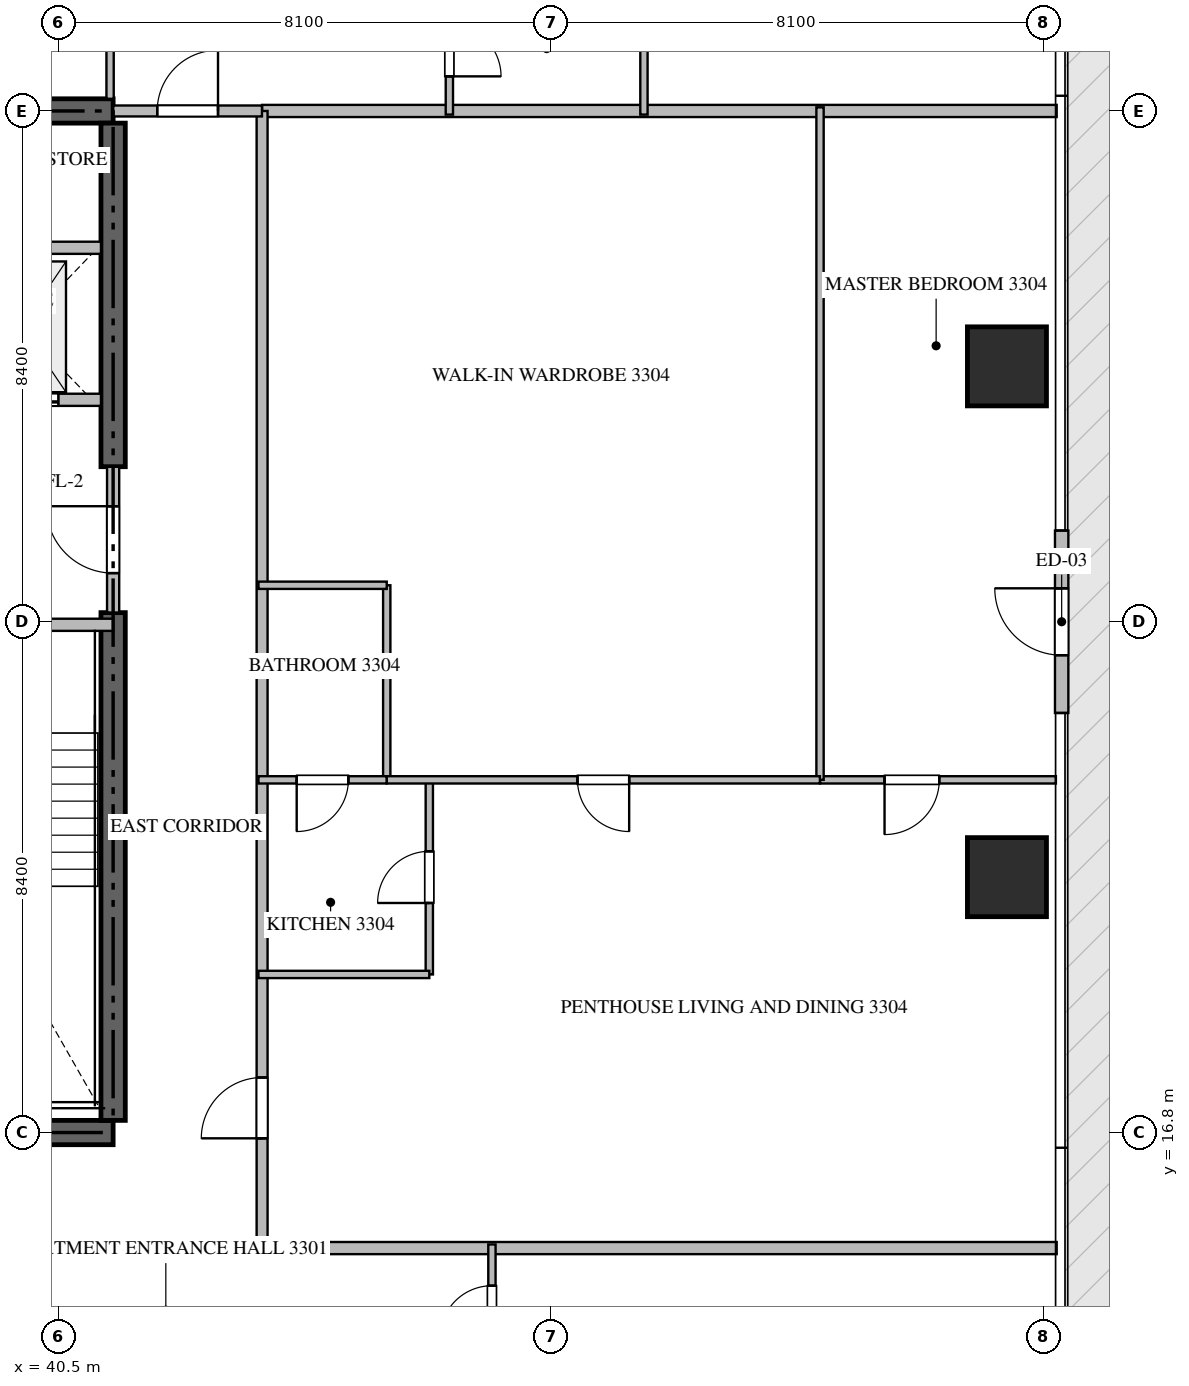
"""IFC4 building model, lengths in metres.
Left out: names, types, materials, properties, quantities, classifications, styles, units other than length and angle.
Written with IfcOpenShell. Run it as: python <this file> out.ifc"""

import sys

from ifc_helpers import new_model, si_unit, direction, frame, frame_2d, origin, origin_2d, place, context, subcontext, project, spatial, rectangle, extrude, source, transform, mapped, element, fill, save


model = new_model("IFC4")
c1 = context("Model", 3, precision=1e-05, world=origin(), true_north=direction((0.0, 1.0)))
c2 = subcontext(c1, "Body", "Model", "MODEL_VIEW")
j1 = project(units=[si_unit("LENGTHUNIT", "METRE"), si_unit("PLANEANGLEUNIT", "RADIAN")], contexts=[c1])
p1 = place(None, origin())
s1 = spatial("IfcSite", under=j1, at=p1, CompositionType="ELEMENT")
p2 = place(p1, origin())
s2 = spatial("IfcBuilding", under=s1, at=p2, CompositionType="ELEMENT")
p3 = place(p2, frame((0.0, 0.0, 135.15)))
s3 = spatial("IfcBuildingStorey", under=s2, at=p3, CompositionType="ELEMENT", Elevation=135.15)
for number, where, z_axis, x_axis in (
    (1, (23.4, 16.8, -0.26), (0.0, 0.0, 1.0), (1.0, 0.0, 0.0)),
    (2, (41.4, 33.6, -0.26), (0.0, 0.0, 1.0), (-1.0, 0.0, 0.0)),
):
    element("IfcWall", number, at=place(p3, frame(where, z_axis=z_axis, x_axis=x_axis)), inside=s3, PredefinedType="SHEAR", context=c2, shape_type="SweptSolid", body=[
        extrude(rectangle(XDim=18.0, YDim=0.4, at=frame_2d((9.0, 0.0))), origin(), (0.0, 0.0, 1.0), 3.748),
    ])
p4 = place(p3, frame((41.4, 17.0, -0.26), z_axis=(0.0, 0.0, 1.0), x_axis=(0.0, 1.0, 0.0)))
e3 = element("IfcWall", 3, at=p4, inside=s3, PredefinedType="SHEAR", context=c2, shape_type="SweptSolid", body=[
    extrude(rectangle(XDim=8.35, YDim=0.4, at=frame_2d((4.175, 0.0))), origin(), (0.0, 0.0, 1.0), 3.748),
])
p5 = place(p3, frame((41.4, 27.75, -0.26), z_axis=(0.0, 0.0, 1.0), x_axis=(0.0, 1.0, 0.0)))
e4 = element("IfcWall", 4, at=p5, inside=s3, PredefinedType="SHEAR", context=c2, shape_type="SweptSolid", body=[
    extrude(rectangle(XDim=5.65, YDim=0.4, at=frame_2d((2.825, 0.0))), origin(), (0.0, 0.0, 1.0), 3.748),
])
m1 = source(origin(), c2, "Body", "SweptSolid", [
    extrude(rectangle(XDim=1.3, YDim=1.3, at=origin_2d()), origin(), (0.0, 0.0, 1.0), 3.75),
])
for number, where, z_axis, x_axis in (
    (5, (56.1, 21.0, -0.26), (0.0, 0.0, 1.0), (1.0, 0.0, 0.0)),
    (6, (56.1, 29.4, -0.26), (0.0, 0.0, 1.0), (1.0, 0.0, 0.0)),
):
    element("IfcColumn", number, at=place(p3, frame(where, z_axis=z_axis, x_axis=x_axis)), inside=s3, PredefinedType="COLUMN", context=c2, shape_type="MappedRepresentation", body=[
        mapped(m1, transform((0.0, 0.0, 0.0), scale=1.0)),
    ])
p6 = place(p3, frame((57.0, 23.7, 0.0), z_axis=(0.0, 0.0, 1.0), x_axis=(0.0, 1.0, 0.0)))
e7 = element("IfcWall", 7, at=p6, inside=s3, PredefinedType="ELEMENTEDWALL", context=c2, shape_type="SweptSolid", body=[
    extrude(rectangle(XDim=3.0, YDim=0.22, at=frame_2d((1.5, 0.0))), origin(), (0.0, 0.0, 1.0), 3.475),
])
p7 = place(p6, frame((0.95, 0.0, 0.0)))
e8 = element("IfcOpeningElement", 8, at=p7, cuts=e7, PredefinedType="OPENING", context=c2, shape_type="SweptSolid", body=[
    extrude(rectangle(XDim=1.1, YDim=2.2, at=frame_2d((0.55, 1.1))), frame((0.0, 0.12, 0.0), z_axis=(0.0, -1.0, 0.0), x_axis=(1.0, 0.0, 0.0)), (0.0, 0.0, 1.0), 0.24),
])
p8 = place(p3, frame((36.95, 25.15, 0.0), z_axis=(0.0, 0.0, 1.0), x_axis=(1.0, 0.0, 0.0)))
e9 = element("IfcWall", 9, at=p8, inside=s3, PredefinedType="STANDARD", context=c2, shape_type="SweptSolid", body=[
    extrude(rectangle(XDim=4.45, YDim=0.2, at=frame_2d((2.225, 0.0))), origin(), (0.0, 0.0, 1.0), 3.49),
])
p9 = place(p8, frame((1.65, 0.0, 0.0)))
e10 = element("IfcOpeningElement", 10, at=p9, cuts=e9, PredefinedType="OPENING", context=c2, shape_type="SweptSolid", body=[
    extrude(rectangle(XDim=1.1, YDim=2.15, at=frame_2d((0.55, 1.075))), frame((0.0, 0.11, 0.0), z_axis=(0.0, -1.0, 0.0), x_axis=(1.0, 0.0, 0.0)), (0.0, 0.0, 1.0), 0.22),
])
p10 = place(p3, frame((38.75, 28.85, 0.0), z_axis=(0.0, 0.0, 1.0), x_axis=(1.0, 0.0, 0.0)))
e11 = element("IfcWall", 11, at=p10, inside=s3, PredefinedType="STANDARD", context=c2, shape_type="SweptSolid", body=[
    extrude(rectangle(XDim=2.45, YDim=0.2, at=frame_2d((1.225, 0.0))), origin(), (0.0, 0.0, 1.0), 3.49),
])
p11 = place(p10, frame((0.55, 0.0, 0.0)))
e12 = element("IfcOpeningElement", 12, at=p11, cuts=e11, PredefinedType="OPENING", context=c2, shape_type="SweptSolid", body=[
    extrude(rectangle(XDim=1.2, YDim=2.2, at=frame_2d((0.6, 1.1))), frame((0.0, 0.11, 0.0), z_axis=(0.0, -1.0, 0.0), x_axis=(1.0, 0.0, 0.0)), (0.0, 0.0, 1.0), 0.22),
])
p12 = place(p3, frame((38.75, 31.35, 0.0), z_axis=(0.0, 0.0, 1.0), x_axis=(1.0, 0.0, 0.0)))
e13 = element("IfcWall", 13, at=p12, inside=s3, PredefinedType="STANDARD", context=c2, shape_type="SweptSolid", body=[
    extrude(rectangle(XDim=2.45, YDim=0.2, at=frame_2d((1.225, 0.0))), origin(), (0.0, 0.0, 1.0), 3.49),
])
p13 = place(p3, frame((41.4, 25.352, 0.0), z_axis=(0.0, 0.0, 1.0), x_axis=(0.0, 1.0, 0.0)))
e14 = element("IfcWall", 14, at=p13, inside=s3, PredefinedType="STANDARD", context=c2, shape_type="SweptSolid", body=[
    extrude(rectangle(XDim=2.396, YDim=0.2, at=frame_2d((1.198, 0.0))), origin(), (0.0, 0.0, 1.0), 3.49),
])
p14 = place(p13, frame((0.648, 0.0, 0.0)))
e15 = element("IfcOpeningElement", 15, at=p14, cuts=e14, PredefinedType="OPENING", context=c2, shape_type="SweptSolid", body=[
    extrude(rectangle(XDim=1.1, YDim=2.15, at=frame_2d((0.55, 1.075))), frame((0.0, 0.11, 0.0), z_axis=(0.0, -1.0, 0.0), x_axis=(1.0, 0.0, 0.0)), (0.0, 0.0, 1.0), 0.22),
])
for number, where, z_axis, x_axis in (
    (16, (43.85, 14.9, 0.0), (0.0, 0.0, 1.0), (1.0, 0.0, 0.0)),
    (17, (43.85, 33.6, 0.0), (0.0, 0.0, 1.0), (1.0, 0.0, 0.0)),
):
    element("IfcWall", number, at=place(p3, frame(where, z_axis=z_axis, x_axis=x_axis)), inside=s3, PredefinedType="PARTITIONING", context=c2, shape_type="SweptSolid", body=[
        extrude(rectangle(XDim=13.068, YDim=0.2, at=frame_2d((6.534, 0.0))), origin(), (0.0, 0.0, 1.0), 3.49),
    ])
p15 = place(p3, frame((20.952, 14.9, 0.0), z_axis=(0.0, 0.0, 1.0), x_axis=(1.0, 0.0, 0.0)))
e18 = element("IfcWall", 18, at=p15, inside=s3, PredefinedType="PARTITIONING", context=c2, shape_type="SweptSolid", body=[
    extrude(rectangle(XDim=22.896, YDim=0.18, at=frame_2d((11.448, 0.0))), origin(), (0.0, 0.0, 1.0), 3.49),
])
p16 = place(p15, frame((15.809, 0.0, 0.0)))
e19 = element("IfcOpeningElement", 19, at=p16, cuts=e18, PredefinedType="OPENING", context=c2, shape_type="SweptSolid", body=[
    extrude(rectangle(XDim=1.0, YDim=2.15, at=frame_2d((0.5, 1.075))), frame((0.0, 0.1, 0.0), z_axis=(0.0, -1.0, 0.0), x_axis=(1.0, 0.0, 0.0)), (0.0, 0.0, 1.0), 0.2),
])
p17 = place(p3, frame((43.85, 14.9, 0.0), z_axis=(0.0, 0.0, 1.0), x_axis=(0.0, 1.0, 0.0)))
e20 = element("IfcWall", 20, at=p17, inside=s3, PredefinedType="PARTITIONING", context=c2, shape_type="SweptSolid", body=[
    extrude(rectangle(XDim=18.7, YDim=0.18, at=frame_2d((9.35, 0.0))), origin(), (0.0, 0.0, 1.0), 3.49),
])
p18 = place(p17, frame((1.805, 0.0, 0.0)))
e21 = element("IfcOpeningElement", 21, at=p18, cuts=e20, PredefinedType="OPENING", context=c2, shape_type="SweptSolid", body=[
    extrude(rectangle(XDim=1.0, YDim=2.15, at=frame_2d((0.5, 1.075))), frame((0.0, 0.1, 0.0), z_axis=(0.0, -1.0, 0.0), x_axis=(1.0, 0.0, 0.0)), (0.0, 0.0, 1.0), 0.2),
])
p19 = place(p3, frame((41.402, 33.6, 0.0), z_axis=(0.0, 0.0, 1.0), x_axis=(1.0, 0.0, 0.0)))
e22 = element("IfcWall", 22, at=p19, inside=s3, PredefinedType="PARTITIONING", context=c2, shape_type="SweptSolid", body=[
    extrude(rectangle(XDim=2.446, YDim=0.18, at=frame_2d((1.223, 0.0))), origin(), (0.0, 0.0, 1.0), 3.49),
])
p20 = place(p19, frame((0.723, 0.0, 0.0)))
e23 = element("IfcOpeningElement", 23, at=p20, cuts=e22, PredefinedType="OPENING", context=c2, shape_type="SweptSolid", body=[
    extrude(rectangle(XDim=1.0, YDim=2.15, at=frame_2d((0.5, 1.075))), frame((0.0, 0.1, 0.0), z_axis=(0.0, -1.0, 0.0), x_axis=(1.0, 0.0, 0.0)), (0.0, 0.0, 1.0), 0.2),
])
p21 = place(p3, frame((47.63, 12.752, 0.0), z_axis=(0.0, 0.0, 1.0), x_axis=(0.0, 1.0, 0.0)))
e24 = element("IfcWall", 24, at=p21, inside=s3, PredefinedType="PARTITIONING", context=c2, shape_type="SweptSolid", body=[
    extrude(rectangle(XDim=2.208, YDim=0.12, at=frame_2d((1.104, 0.0))), origin(), (0.0, 0.0, 1.0), 3.49),
])
p22 = place(p21, frame((0.679, 0.0, 0.0)))
e25 = element("IfcOpeningElement", 25, at=p22, cuts=e24, PredefinedType="OPENING", context=c2, shape_type="SweptSolid", body=[
    extrude(rectangle(XDim=0.85, YDim=2.1, at=frame_2d((0.425, 1.05))), frame((0.0, 0.07, 0.0), z_axis=(0.0, -1.0, 0.0), x_axis=(1.0, 0.0, 0.0)), (0.0, 0.0, 1.0), 0.14),
])
p23 = place(p3, frame((41.35, 36.35, 0.0), z_axis=(0.0, 0.0, 1.0), x_axis=(0.0, -1.0, 0.0)))
e26 = element("IfcWall", 26, at=p23, inside=s3, PredefinedType="PARTITIONING", context=c2, shape_type="SweptSolid", body=[
    extrude(rectangle(XDim=2.55, YDim=0.12, at=frame_2d((1.275, 0.0))), origin(), (0.0, 0.0, 1.0), 3.49),
])
p24 = place(p3, frame((50.13, 35.65, 0.0), z_axis=(0.0, 0.0, 1.0), x_axis=(0.0, -1.0, 0.0)))
e27 = element("IfcWall", 27, at=p24, inside=s3, PredefinedType="PARTITIONING", context=c2, shape_type="SweptSolid", body=[
    extrude(rectangle(XDim=2.11, YDim=0.12, at=frame_2d((1.055, 0.0))), origin(), (0.0, 0.0, 1.0), 3.49),
])
p25 = place(p3, frame((46.93, 35.648, 0.0), z_axis=(0.0, 0.0, 1.0), x_axis=(0.0, -1.0, 0.0)))
e28 = element("IfcWall", 28, at=p25, inside=s3, PredefinedType="PARTITIONING", context=c2, shape_type="SweptSolid", body=[
    extrude(rectangle(XDim=2.108, YDim=0.12, at=frame_2d((1.054, 0.0))), origin(), (0.0, 0.0, 1.0), 3.49),
])
p26 = place(p25, frame((0.629, 0.0, 0.0)))
e29 = element("IfcOpeningElement", 29, at=p26, cuts=e28, PredefinedType="OPENING", context=c2, shape_type="SweptSolid", body=[
    extrude(rectangle(XDim=0.85, YDim=2.1, at=frame_2d((0.425, 1.05))), frame((0.0, 0.07, 0.0), z_axis=(0.0, -1.0, 0.0), x_axis=(1.0, 0.0, 0.0)), (0.0, 0.0, 1.0), 0.14),
])
p27 = place(p3, frame((46.6, 19.4, 0.0), z_axis=(0.0, 0.0, 1.0), x_axis=(0.0, 1.0, 0.0)))
e30 = element("IfcWall", 30, at=p27, inside=s3, PredefinedType="PARTITIONING", context=c2, shape_type="SweptSolid", body=[
    extrude(rectangle(XDim=3.2, YDim=0.12, at=frame_2d((1.6, 0.0))), origin(), (0.0, 0.0, 1.0), 3.49),
])
p28 = place(p27, frame((1.175, 0.0, 0.0)))
e31 = element("IfcOpeningElement", 31, at=p28, cuts=e30, PredefinedType="OPENING", context=c2, shape_type="SweptSolid", body=[
    extrude(rectangle(XDim=0.85, YDim=2.1, at=frame_2d((0.425, 1.05))), frame((0.0, 0.07, 0.0), z_axis=(0.0, -1.0, 0.0), x_axis=(1.0, 0.0, 0.0)), (0.0, 0.0, 1.0), 0.14),
])
p29 = place(p3, frame((46.6, 19.4, 0.0), z_axis=(0.0, 0.0, 1.0), x_axis=(-1.0, 0.0, 0.0)))
e32 = element("IfcWall", 32, at=p29, inside=s3, PredefinedType="PARTITIONING", context=c2, shape_type="SweptSolid", body=[
    extrude(rectangle(XDim=2.81, YDim=0.12, at=frame_2d((1.405, 0.0))), origin(), (0.0, 0.0, 1.0), 3.49),
])
p30 = place(p3, frame((56.905, 22.6, 0.0), z_axis=(0.0, 0.0, 1.0), x_axis=(-1.0, 0.0, 0.0)))
e33 = element("IfcWall", 33, at=p30, inside=s3, PredefinedType="PARTITIONING", context=c2, shape_type="SweptSolid", body=[
    extrude(rectangle(XDim=3.879, YDim=0.12, at=frame_2d((1.939, 0.0))), origin(), (0.0, 0.0, 1.0), 3.49),
])
p31 = place(p30, frame((1.918, 0.0, 0.0)))
e34 = element("IfcOpeningElement", 34, at=p31, cuts=e33, PredefinedType="OPENING", context=c2, shape_type="SweptSolid", body=[
    extrude(rectangle(XDim=0.9, YDim=2.1, at=frame_2d((0.45, 1.05))), frame((0.0, 0.07, 0.0), z_axis=(0.0, -1.0, 0.0), x_axis=(1.0, 0.0, 0.0)), (0.0, 0.0, 1.0), 0.14),
])
p32 = place(p3, frame((53.026, 22.6, 0.0), z_axis=(0.0, 0.0, 1.0), x_axis=(0.0, 1.0, 0.0)))
e35 = element("IfcWall", 35, at=p32, inside=s3, PredefinedType="PARTITIONING", context=c2, shape_type="SweptSolid", body=[
    extrude(rectangle(XDim=11.06, YDim=0.12, at=frame_2d((5.53, 0.0))), origin(), (0.0, 0.0, 1.0), 3.49),
])
p33 = place(p3, frame((45.9, 22.6, 0.0), z_axis=(0.0, 0.0, 1.0), x_axis=(0.0, 1.0, 0.0)))
e36 = element("IfcWall", 36, at=p33, inside=s3, PredefinedType="PARTITIONING", context=c2, shape_type="SweptSolid", body=[
    extrude(rectangle(XDim=3.2, YDim=0.12, at=frame_2d((1.6, 0.0))), origin(), (0.0, 0.0, 1.0), 3.49),
])
p34 = place(p3, frame((45.9, 25.8, 0.0), z_axis=(0.0, 0.0, 1.0), x_axis=(-1.0, 0.0, 0.0)))
e37 = element("IfcWall", 37, at=p34, inside=s3, PredefinedType="PARTITIONING", context=c2, shape_type="SweptSolid", body=[
    extrude(rectangle(XDim=2.11, YDim=0.12, at=frame_2d((1.055, 0.0))), origin(), (0.0, 0.0, 1.0), 3.49),
])
p35 = place(p3, frame((53.024, 22.6, 0.0), z_axis=(0.0, 0.0, 1.0), x_axis=(-1.0, 0.0, 0.0)))
e38 = element("IfcWall", 38, at=p35, inside=s3, PredefinedType="PARTITIONING", context=c2, shape_type="SweptSolid", body=[
    extrude(rectangle(XDim=7.124, YDim=0.12, at=frame_2d((3.562, 0.0))), origin(), (0.0, 0.0, 1.0), 3.49),
])
p36 = place(p35, frame((3.137, 0.0, 0.0)))
e39 = element("IfcOpeningElement", 39, at=p36, cuts=e38, PredefinedType="OPENING", context=c2, shape_type="SweptSolid", body=[
    extrude(rectangle(XDim=0.85, YDim=2.1, at=frame_2d((0.425, 1.05))), frame((0.0, 0.07, 0.0), z_axis=(0.0, -1.0, 0.0), x_axis=(1.0, 0.0, 0.0)), (0.0, 0.0, 1.0), 0.14),
])
p37 = place(p3, frame((45.898, 22.6, 0.0), z_axis=(0.0, 0.0, 1.0), x_axis=(-1.0, 0.0, 0.0)))
e40 = element("IfcWall", 40, at=p37, inside=s3, PredefinedType="PARTITIONING", context=c2, shape_type="SweptSolid", body=[
    extrude(rectangle(XDim=2.108, YDim=0.12, at=frame_2d((1.054, 0.0))), origin(), (0.0, 0.0, 1.0), 3.49),
])
p38 = place(p37, frame((0.629, 0.0, 0.0)))
e41 = element("IfcOpeningElement", 41, at=p38, cuts=e40, PredefinedType="OPENING", context=c2, shape_type="SweptSolid", body=[
    extrude(rectangle(XDim=0.85, YDim=2.1, at=frame_2d((0.425, 1.05))), frame((0.0, 0.07, 0.0), z_axis=(0.0, -1.0, 0.0), x_axis=(1.0, 0.0, 0.0)), (0.0, 0.0, 1.0), 0.14),
])
m2 = source(origin(), c2, "Body", "SweptSolid", [
    extrude(rectangle(XDim=1.1, YDim=2.2, at=frame_2d((0.55, 1.1))), frame((0.0, 0.025, 0.0), z_axis=(0.0, -1.0, 0.0), x_axis=(1.0, 0.0, 0.0)), (0.0, 0.0, 1.0), 0.05),
])
p39 = place(p7, origin())
e42 = element("IfcDoor", 42, at=p39, inside=s3, OperationType="SINGLE_SWING_RIGHT", PredefinedType="DOOR", context=c2, shape_type="MappedRepresentation", body=[
    mapped(m2, transform((0.0, 0.0, 0.0), scale=1.0)),
])
fill(e8, e42)
m3 = source(origin(), c2, "Body", "SweptSolid", [
    extrude(rectangle(XDim=1.2, YDim=2.2, at=frame_2d((0.6, 1.1))), frame((0.0, 0.025, 0.0), z_axis=(0.0, -1.0, 0.0), x_axis=(1.0, 0.0, 0.0)), (0.0, 0.0, 1.0), 0.05),
])
p40 = place(p11, origin())
e43 = element("IfcDoor", 43, at=p40, inside=s3, OperationType="DOUBLE_DOOR_SLIDING", PredefinedType="DOOR", context=c2, shape_type="MappedRepresentation", body=[
    mapped(m3, transform((0.0, 0.0, 0.0), scale=1.0)),
])
fill(e12, e43)
m4 = source(origin(), c2, "Body", "SweptSolid", [
    extrude(rectangle(XDim=1.1, YDim=2.15, at=frame_2d((0.55, 1.075))), frame((0.0, 0.025, 0.0), z_axis=(0.0, -1.0, 0.0), x_axis=(1.0, 0.0, 0.0)), (0.0, 0.0, 1.0), 0.05),
])
p41 = place(p14, origin())
e44 = element("IfcDoor", 44, at=p41, inside=s3, OperationType="SINGLE_SWING_RIGHT", PredefinedType="DOOR", context=c2, shape_type="MappedRepresentation", body=[
    mapped(m4, transform((0.0, 0.0, 0.0), scale=1.0)),
])
fill(e15, e44)
m5 = source(origin(), c2, "Body", "SweptSolid", [
    extrude(rectangle(XDim=1.0, YDim=2.15, at=frame_2d((0.5, 1.075))), frame((0.0, 0.025, 0.0), z_axis=(0.0, -1.0, 0.0), x_axis=(1.0, 0.0, 0.0)), (0.0, 0.0, 1.0), 0.05),
])
p42 = place(p18, origin())
e45 = element("IfcDoor", 45, at=p42, inside=s3, OperationType="SINGLE_SWING_LEFT", PredefinedType="DOOR", context=c2, shape_type="MappedRepresentation", body=[
    mapped(m5, transform((0.0, 0.0, 0.0), scale=1.0)),
])
fill(e21, e45)
p43 = place(p20, origin())
e46 = element("IfcDoor", 46, at=p43, inside=s3, OperationType="SINGLE_SWING_RIGHT", PredefinedType="DOOR", context=c2, shape_type="MappedRepresentation", body=[
    mapped(m5, transform((0.0, 0.0, 0.0), scale=1.0)),
])
fill(e23, e46)
m6 = source(origin(), c2, "Body", "SweptSolid", [
    extrude(rectangle(XDim=0.85, YDim=2.1, at=frame_2d((0.425, 1.05))), frame((0.0, 0.025, 0.0), z_axis=(0.0, -1.0, 0.0), x_axis=(1.0, 0.0, 0.0)), (0.0, 0.0, 1.0), 0.05),
])
p44 = place(p22, origin())
e47 = element("IfcDoor", 47, at=p44, inside=s3, OperationType="SINGLE_SWING_LEFT", PredefinedType="DOOR", context=c2, shape_type="MappedRepresentation", body=[
    mapped(m6, transform((0.0, 0.0, 0.0), scale=1.0)),
])
fill(e25, e47)
p45 = place(p26, origin())
e48 = element("IfcDoor", 48, at=p45, inside=s3, OperationType="SINGLE_SWING_RIGHT", PredefinedType="DOOR", context=c2, shape_type="MappedRepresentation", body=[
    mapped(m6, transform((0.0, 0.0, 0.0), scale=1.0)),
])
fill(e29, e48)
p46 = place(p28, origin())
e49 = element("IfcDoor", 49, at=p46, inside=s3, OperationType="SINGLE_SWING_LEFT", PredefinedType="DOOR", context=c2, shape_type="MappedRepresentation", body=[
    mapped(m6, transform((0.0, 0.0, 0.0), scale=1.0)),
])
fill(e31, e49)
m7 = source(origin(), c2, "Body", "SweptSolid", [
    extrude(rectangle(XDim=0.9, YDim=2.1, at=frame_2d((0.45, 1.05))), frame((0.0, 0.025, 0.0), z_axis=(0.0, -1.0, 0.0), x_axis=(1.0, 0.0, 0.0)), (0.0, 0.0, 1.0), 0.05),
])
p47 = place(p31, origin())
e50 = element("IfcDoor", 50, at=p47, inside=s3, OperationType="SINGLE_SWING_RIGHT", PredefinedType="DOOR", context=c2, shape_type="MappedRepresentation", body=[
    mapped(m7, transform((0.0, 0.0, 0.0), scale=1.0)),
])
fill(e34, e50)
p48 = place(p36, origin())
e51 = element("IfcDoor", 51, at=p48, inside=s3, OperationType="SINGLE_SWING_LEFT", PredefinedType="DOOR", context=c2, shape_type="MappedRepresentation", body=[
    mapped(m6, transform((0.0, 0.0, 0.0), scale=1.0)),
])
fill(e39, e51)
p49 = place(p38, origin())
e52 = element("IfcDoor", 52, at=p49, inside=s3, OperationType="SINGLE_SWING_RIGHT", PredefinedType="DOOR", context=c2, shape_type="MappedRepresentation", body=[
    mapped(m6, transform((0.0, 0.0, 0.0), scale=1.0)),
])
fill(e41, e52)
save(model, sys.argv[1])
